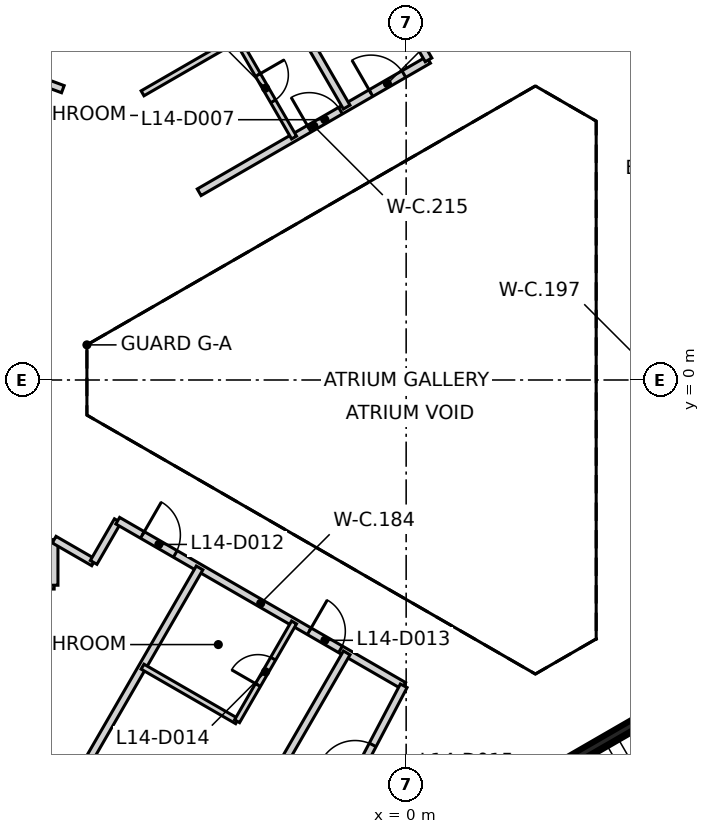
"""IFC4 building model, lengths in metres.
Left out: names, types, materials, properties, quantities, classifications, styles, units other than length and angle.
Written with IfcOpenShell. Run it as: python <this file> out.ifc"""

import sys

from ifc_helpers import new_model, si_unit, direction, frame, frame_2d, origin, place, context, subcontext, project, spatial, rectangle, extrude, element, fill, save


model = new_model("IFC4")
c1 = context("Model", 3, precision=1e-05, world=origin(), true_north=direction((0.0, 1.0)))
c2 = subcontext(c1, "Body", "Model", "MODEL_VIEW")
j1 = project(units=[si_unit("LENGTHUNIT", "METRE"), si_unit("PLANEANGLEUNIT", "RADIAN")], contexts=[c1])
p1 = place(None, origin())
s1 = spatial("IfcSite", under=j1, at=p1, CompositionType="ELEMENT")
p2 = place(p1, origin())
s2 = spatial("IfcBuilding", under=s1, at=p2, CompositionType="ELEMENT")
p3 = place(p2, frame((0.0, 0.0, 63.8)))
s3 = spatial("IfcBuildingStorey", under=s2, at=p3, CompositionType="ELEMENT", Elevation=63.8)
p4 = place(p3, frame((10.42, 6.498, 0.0), z_axis=(0.0, 0.0, 1.0), x_axis=(-0.866021906294, 0.500006057782, 0.0)))
e1 = element("IfcWall", 1, at=p4, inside=s3, PredefinedType="SHEAR", context=c2, shape_type="SweptSolid", body=[
    extrude(rectangle(XDim=11.55, YDim=0.25, at=frame_2d((5.775, 0.0))), origin(), (0.0, 0.0, 1.0), 3.125),
])
p5 = place(p4, frame((10.025, 0.0, 0.0)))
e2 = element("IfcOpeningElement", 2, at=p5, cuts=e1, PredefinedType="OPENING", context=c2, shape_type="SweptSolid", body=[
    extrude(rectangle(XDim=1.2, YDim=2.1, at=frame_2d((0.6, 1.05))), frame((0.0, 0.135, 0.0), z_axis=(0.0, -1.0, 0.0), x_axis=(1.0, 0.0, 0.0)), (0.0, 0.0, 1.0), 0.27),
])
p6 = place(p4, frame((8.725, 0.0, 0.0)))
e3 = element("IfcOpeningElement", 3, at=p6, cuts=e1, PredefinedType="OPENING", context=c2, shape_type="SweptSolid", body=[
    extrude(rectangle(XDim=1.2, YDim=2.1, at=frame_2d((0.6, 1.05))), frame((0.0, 0.135, 0.0), z_axis=(0.0, -1.0, 0.0), x_axis=(1.0, 0.0, 0.0)), (0.0, 0.0, 1.0), 0.27),
])
p7 = place(p3, frame((0.417, -12.273, 0.0), z_axis=(0.0, 0.0, 1.0), x_axis=(0.866021906294, 0.500006057782, 0.0)))
e4 = element("IfcWall", 4, at=p7, inside=s3, PredefinedType="SHEAR", context=c2, shape_type="SweptSolid", body=[
    extrude(rectangle(XDim=11.55, YDim=0.25, at=frame_2d((5.775, 0.0))), origin(), (0.0, 0.0, 1.0), 3.125),
])
p8 = place(p7, frame((10.025, 0.0, 0.0)))
e5 = element("IfcOpeningElement", 5, at=p8, cuts=e4, PredefinedType="OPENING", context=c2, shape_type="SweptSolid", body=[
    extrude(rectangle(XDim=1.2, YDim=2.1, at=frame_2d((0.6, 1.05))), frame((0.0, 0.135, 0.0), z_axis=(0.0, -1.0, 0.0), x_axis=(1.0, 0.0, 0.0)), (0.0, 0.0, 1.0), 0.27),
])
p9 = place(p7, frame((8.725, 0.0, 0.0)))
e6 = element("IfcOpeningElement", 6, at=p9, cuts=e4, PredefinedType="OPENING", context=c2, shape_type="SweptSolid", body=[
    extrude(rectangle(XDim=1.2, YDim=2.1, at=frame_2d((0.6, 1.05))), frame((0.0, 0.135, 0.0), z_axis=(0.0, -1.0, 0.0), x_axis=(1.0, 0.0, 0.0)), (0.0, 0.0, 1.0), 0.27),
])
p10 = place(p3, frame((-16.026, 10.247, 0.0), z_axis=(0.0, 0.0, 1.0), x_axis=(0.937540909117, -0.347875040397, 0.0)))
e7 = element("IfcWall", 7, at=p10, inside=s3, PredefinedType="PARTITIONING", context=c2, shape_type="SweptSolid", body=[
    extrude(rectangle(XDim=7.459, YDim=0.2, at=frame_2d((3.729, 0.0))), origin(), (0.0, 0.0, 1.0), 3.125),
])
p11 = place(p10, frame((3.396, 0.0, 0.0)))
e8 = element("IfcOpeningElement", 8, at=p11, cuts=e7, PredefinedType="OPENING", context=c2, shape_type="SweptSolid", body=[
    extrude(rectangle(XDim=0.95, YDim=2.1, at=frame_2d((0.475, 1.05))), frame((0.0, 0.11, 0.0), z_axis=(0.0, -1.0, 0.0), x_axis=(1.0, 0.0, 0.0)), (0.0, 0.0, 1.0), 0.22),
])
p12 = place(p3, frame((-10.652, -5.4, 0.0), z_axis=(0.0, 0.0, 1.0), x_axis=(1.0, 0.0, 0.0)))
e9 = element("IfcWall", 9, at=p12, inside=s3, PredefinedType="PARTITIONING", context=c2, shape_type="SweptSolid", body=[
    extrude(rectangle(XDim=1.39, YDim=0.2, at=frame_2d((0.695, 0.0))), origin(), (0.0, 0.0, 1.0), 3.125),
])
for number, where, z_axis, x_axis in (
    (10, (-9.262, -5.4, 0.0), (0.0, 0.0, 1.0), (0.0, 1.0, 0.0)),
    (11, (-9.262, -4.2, 0.0), (0.0, 0.0, 1.0), (0.866, -0.5, 0.0)),
):
    element("IfcWall", number, at=place(p3, frame(where, z_axis=z_axis, x_axis=x_axis)), inside=s3, PredefinedType="PARTITIONING", context=c2, shape_type="SweptSolid", body=[
        extrude(rectangle(XDim=1.2, YDim=0.2, at=frame_2d((0.6, 0.0))), origin(), (0.0, 0.0, 1.0), 3.125),
    ])
p13 = place(p3, frame((-8.223, -4.8, 0.0), z_axis=(0.0, 0.0, 1.0), x_axis=(0.499866914522, 0.866102227088, 0.0)))
e12 = element("IfcWall", 12, at=p13, inside=s3, PredefinedType="PARTITIONING", context=c2, shape_type="SweptSolid", body=[
    extrude(rectangle(XDim=1.268, YDim=0.2, at=frame_2d((0.634, 0.0))), origin(), (0.0, 0.0, 1.0), 3.125),
])
p14 = place(p3, frame((-7.589, -3.702, 0.0), z_axis=(0.0, 0.0, 1.0), x_axis=(0.865995139556, -0.500052415518, 0.0)))
e13 = element("IfcWall", 13, at=p14, inside=s3, PredefinedType="PARTITIONING", context=c2, shape_type="SweptSolid", body=[
    extrude(rectangle(XDim=8.689, YDim=0.2, at=frame_2d((4.344, 0.0))), origin(), (0.0, 0.0, 1.0), 3.125),
])
p15 = place(p14, frame((0.749, 0.0, 0.0)))
e14 = element("IfcOpeningElement", 14, at=p15, cuts=e13, PredefinedType="OPENING", context=c2, shape_type="SweptSolid", body=[
    extrude(rectangle(XDim=1.0, YDim=2.1, at=frame_2d((0.5, 1.05))), frame((0.0, 0.11, 0.0), z_axis=(0.0, -1.0, 0.0), x_axis=(1.0, 0.0, 0.0)), (0.0, 0.0, 1.0), 0.22),
])
p16 = place(p14, frame((5.819, 0.0, 0.0)))
e15 = element("IfcOpeningElement", 15, at=p16, cuts=e13, PredefinedType="OPENING", context=c2, shape_type="SweptSolid", body=[
    extrude(rectangle(XDim=0.95, YDim=2.1, at=frame_2d((0.475, 1.05))), frame((0.0, 0.11, 0.0), z_axis=(0.0, -1.0, 0.0), x_axis=(1.0, 0.0, 0.0)), (0.0, 0.0, 1.0), 0.22),
])
p17 = place(p3, frame((-5.446, 4.94, 0.0), z_axis=(0.0, 0.0, 1.0), x_axis=(0.866096332545, 0.499877127655, 0.0)))
e16 = element("IfcWall", 16, at=p17, inside=s3, PredefinedType="PARTITIONING", context=c2, shape_type="SweptSolid", body=[
    extrude(rectangle(XDim=6.969, YDim=0.2, at=frame_2d((3.484, 0.0))), origin(), (0.0, 0.0, 1.0), 3.125),
])
p18 = place(p17, frame((5.219, 0.0, 0.0)))
e17 = element("IfcOpeningElement", 17, at=p18, cuts=e16, PredefinedType="OPENING", context=c2, shape_type="SweptSolid", body=[
    extrude(rectangle(XDim=1.0, YDim=2.1, at=frame_2d((0.5, 1.05))), frame((0.0, 0.11, 0.0), z_axis=(0.0, -1.0, 0.0), x_axis=(1.0, 0.0, 0.0)), (0.0, 0.0, 1.0), 0.22),
])
p19 = place(p17, frame((3.344, 0.0, 0.0)))
e18 = element("IfcOpeningElement", 18, at=p19, cuts=e16, PredefinedType="OPENING", context=c2, shape_type="SweptSolid", body=[
    extrude(rectangle(XDim=0.95, YDim=2.1, at=frame_2d((0.475, 1.05))), frame((0.0, 0.11, 0.0), z_axis=(0.0, -1.0, 0.0), x_axis=(1.0, 0.0, 0.0)), (0.0, 0.0, 1.0), 0.22),
])
p20 = place(p3, frame((-2.162, -12.041, 0.0), z_axis=(0.0, 0.0, 1.0), x_axis=(0.464956890881, 0.885333321197, 0.0)))
e19 = element("IfcWall", 19, at=p20, inside=s3, PredefinedType="PARTITIONING", context=c2, shape_type="SweptSolid", body=[
    extrude(rectangle(XDim=4.512, YDim=0.2, at=frame_2d((2.256, 0.0))), origin(), (0.0, 0.0, 1.0), 3.125),
])
p21 = place(p20, frame((1.756, 0.0, 0.0)))
e20 = element("IfcOpeningElement", 20, at=p21, cuts=e19, PredefinedType="OPENING", context=c2, shape_type="SweptSolid", body=[
    extrude(rectangle(XDim=1.0, YDim=2.1, at=frame_2d((0.5, 1.05))), frame((0.0, 0.11, 0.0), z_axis=(0.0, -1.0, 0.0), x_axis=(1.0, 0.0, 0.0)), (0.0, 0.0, 1.0), 0.22),
])
p22 = place(p3, frame((-0.045, 9.521, 0.0), z_axis=(0.0, 0.0, 1.0), x_axis=(0.500094716449, -0.865970712311, 0.0)))
e21 = element("IfcWall", 21, at=p22, inside=s3, PredefinedType="PARTITIONING", context=c2, shape_type="SweptSolid", body=[
    extrude(rectangle(XDim=1.268, YDim=0.2, at=frame_2d((0.634, 0.0))), origin(), (0.0, 0.0, 1.0), 3.125),
])
p23 = place(p3, frame((-14.148, -20.035, 0.0), z_axis=(0.0, 0.0, 1.0), x_axis=(0.500005855417, 0.866022023131, 0.0)))
e22 = element("IfcWall", 22, at=p23, inside=s3, PredefinedType="PARTITIONING", context=c2, shape_type="SweptSolid", body=[
    extrude(rectangle(XDim=17.425, YDim=0.2, at=frame_2d((8.712, 0.0))), origin(), (0.0, 0.0, 1.0), 3.125),
])
p24 = place(p3, frame((-10.276, 22.271, 0.0), z_axis=(0.0, 0.0, 1.0), x_axis=(0.499975954304, -0.866039286129, 0.0)))
e23 = element("IfcWall", 23, at=p24, inside=s3, PredefinedType="PARTITIONING", context=c2, shape_type="SweptSolid", body=[
    extrude(rectangle(XDim=17.424, YDim=0.2, at=frame_2d((8.712, 0.0))), origin(), (0.0, 0.0, 1.0), 3.125),
])
p25 = place(p3, frame((-10.276, -22.271, 0.0), z_axis=(0.0, 0.0, 1.0), x_axis=(0.49999372146, 0.866029028671, 0.0)))
e24 = element("IfcWall", 24, at=p25, inside=s3, PredefinedType="PARTITIONING", context=c2, shape_type="SweptSolid", body=[
    extrude(rectangle(XDim=17.425, YDim=0.2, at=frame_2d((8.712, 0.0))), origin(), (0.0, 0.0, 1.0), 3.125),
])
for number, where, z_axis, x_axis in (
    (25, (-6.936, -7.543, 0.0), (0.0, 0.0, 1.0), (0.866, -0.5, 0.0)),
    (26, (-6.936, 7.543, 0.0), (0.0, 0.0, 1.0), (0.866, 0.5, 0.0)),
):
    element("IfcWall", number, at=place(p3, frame(where, z_axis=z_axis, x_axis=x_axis)), inside=s3, PredefinedType="PARTITIONING", context=c2, shape_type="SweptSolid", body=[
        extrude(rectangle(XDim=2.871, YDim=0.15, at=frame_2d((1.436, 0.0))), origin(), (0.0, 0.0, 1.0), 3.125),
    ])
p26 = place(p3, frame((-4.449, -8.978, 0.0), z_axis=(0.0, 0.0, 1.0), x_axis=(0.499745940409, 0.866172035478, 0.0)))
e27 = element("IfcWall", 27, at=p26, inside=s3, PredefinedType="PARTITIONING", context=c2, shape_type="SweptSolid", body=[
    extrude(rectangle(XDim=3.0, YDim=0.15, at=frame_2d((1.5, 0.0))), origin(), (0.0, 0.0, 1.0), 3.125),
])
p27 = place(p26, frame((1.1, 0.0, 0.0)))
e28 = element("IfcOpeningElement", 28, at=p27, cuts=e27, PredefinedType="OPENING", context=c2, shape_type="SweptSolid", body=[
    extrude(rectangle(XDim=0.8, YDim=2.1, at=frame_2d((0.4, 1.05))), frame((0.0, 0.085, 0.0), z_axis=(0.0, -1.0, 0.0), x_axis=(1.0, 0.0, 0.0)), (0.0, 0.0, 1.0), 0.17),
])
p28 = place(p3, frame((-4.449, 8.978, 0.0), z_axis=(0.0, 0.0, 1.0), x_axis=(0.499745940409, -0.866172035478, 0.0)))
e29 = element("IfcWall", 29, at=p28, inside=s3, PredefinedType="PARTITIONING", context=c2, shape_type="SweptSolid", body=[
    extrude(rectangle(XDim=3.0, YDim=0.15, at=frame_2d((1.5, 0.0))), origin(), (0.0, 0.0, 1.0), 3.125),
])
p29 = place(p28, frame((1.1, 0.0, 0.0)))
e30 = element("IfcOpeningElement", 30, at=p29, cuts=e29, PredefinedType="OPENING", context=c2, shape_type="SweptSolid", body=[
    extrude(rectangle(XDim=0.8, YDim=2.1, at=frame_2d((0.4, 1.05))), frame((0.0, 0.085, 0.0), z_axis=(0.0, -1.0, 0.0), x_axis=(1.0, 0.0, 0.0)), (0.0, 0.0, 1.0), 0.17),
])
p30 = place(p18, origin())
e31 = element("IfcDoor", 31, at=p30, inside=s3, OperationType="SINGLE_SWING_LEFT", PredefinedType="DOOR", context=c2, shape_type="SweptSolid", body=[
    extrude(rectangle(XDim=1.0, YDim=2.1, at=frame_2d((0.5, 1.05))), frame((0.0, 0.025, 0.0), z_axis=(0.0, -1.0, 0.0), x_axis=(1.0, 0.0, 0.0)), (0.0, 0.0, 1.0), 0.05),
])
fill(e17, e31)
p31 = place(p19, origin())
e32 = element("IfcDoor", 32, at=p31, inside=s3, OperationType="SINGLE_SWING_LEFT", PredefinedType="DOOR", context=c2, shape_type="SweptSolid", body=[
    extrude(rectangle(XDim=0.95, YDim=2.1, at=frame_2d((0.475, 1.05))), frame((0.0, 0.025, 0.0), z_axis=(0.0, -1.0, 0.0), x_axis=(1.0, 0.0, 0.0)), (0.0, 0.0, 1.0), 0.05),
])
fill(e18, e32)
p32 = place(p29, frame((0.8, 0.0, 0.0), z_axis=(0.0, 0.0, 1.0), x_axis=(-1.0, 0.0, 0.0)))
e33 = element("IfcDoor", 33, at=p32, inside=s3, OperationType="SINGLE_SWING_LEFT", PredefinedType="DOOR", context=c2, shape_type="SweptSolid", body=[
    extrude(rectangle(XDim=0.8, YDim=2.1, at=frame_2d((0.4, 1.05))), frame((0.0, 0.025, 0.0), z_axis=(0.0, -1.0, 0.0), x_axis=(1.0, 0.0, 0.0)), (0.0, 0.0, 1.0), 0.05),
])
fill(e30, e33)
p33 = place(p15, frame((1.0, 0.0, 0.0), z_axis=(0.0, 0.0, 1.0), x_axis=(-1.0, 0.0, 0.0)))
e34 = element("IfcDoor", 34, at=p33, inside=s3, OperationType="SINGLE_SWING_LEFT", PredefinedType="DOOR", context=c2, shape_type="SweptSolid", body=[
    extrude(rectangle(XDim=1.0, YDim=2.1, at=frame_2d((0.5, 1.05))), frame((0.0, 0.025, 0.0), z_axis=(0.0, -1.0, 0.0), x_axis=(1.0, 0.0, 0.0)), (0.0, 0.0, 1.0), 0.05),
])
fill(e14, e34)
p34 = place(p16, frame((0.95, 0.0, 0.0), z_axis=(0.0, 0.0, 1.0), x_axis=(-1.0, 0.0, 0.0)))
e35 = element("IfcDoor", 35, at=p34, inside=s3, OperationType="SINGLE_SWING_LEFT", PredefinedType="DOOR", context=c2, shape_type="SweptSolid", body=[
    extrude(rectangle(XDim=0.95, YDim=2.1, at=frame_2d((0.475, 1.05))), frame((0.0, 0.025, 0.0), z_axis=(0.0, -1.0, 0.0), x_axis=(1.0, 0.0, 0.0)), (0.0, 0.0, 1.0), 0.05),
])
fill(e15, e35)
p35 = place(p27, origin())
e36 = element("IfcDoor", 36, at=p35, inside=s3, OperationType="SINGLE_SWING_LEFT", PredefinedType="DOOR", context=c2, shape_type="SweptSolid", body=[
    extrude(rectangle(XDim=0.8, YDim=2.1, at=frame_2d((0.4, 1.05))), frame((0.0, 0.025, 0.0), z_axis=(0.0, -1.0, 0.0), x_axis=(1.0, 0.0, 0.0)), (0.0, 0.0, 1.0), 0.05),
])
fill(e28, e36)
p36 = place(p21, origin())
e37 = element("IfcDoor", 37, at=p36, inside=s3, OperationType="SINGLE_SWING_LEFT", PredefinedType="DOOR", context=c2, shape_type="SweptSolid", body=[
    extrude(rectangle(XDim=1.0, YDim=2.1, at=frame_2d((0.5, 1.05))), frame((0.0, 0.025, 0.0), z_axis=(0.0, -1.0, 0.0), x_axis=(1.0, 0.0, 0.0)), (0.0, 0.0, 1.0), 0.05),
])
fill(e20, e37)
save(model, sys.argv[1])
